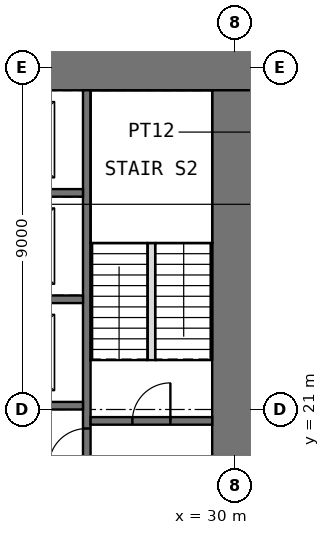
"""IFC4 building model, lengths in metres.
Left out: names, types, materials, properties, quantities, classifications, styles, units other than length and angle.
Written with IfcOpenShell. Run it as: python <this file> out.ifc"""

import sys

from ifc_helpers import new_model, si_unit, direction, frame, frame_2d, origin, place, context, subcontext, project, spatial, rectangle, extrude, element, fill, save


model = new_model("IFC4")
c1 = context("Model", 3, precision=1e-05, world=origin(), true_north=direction((0.0, 1.0)))
c2 = subcontext(c1, "Body", "Model", "MODEL_VIEW")
j1 = project(units=[si_unit("LENGTHUNIT", "METRE"), si_unit("PLANEANGLEUNIT", "RADIAN")], contexts=[c1])
p1 = place(None, origin())
s1 = spatial("IfcSite", under=j1, at=p1, CompositionType="ELEMENT")
p2 = place(p1, origin())
s2 = spatial("IfcBuilding", under=s1, at=p2, CompositionType="ELEMENT")
p3 = place(p2, frame((0.0, 0.0, 42.5)))
s3 = spatial("IfcBuildingStorey", under=s2, at=p3, CompositionType="ELEMENT", Elevation=42.5)
p4 = place(p3, frame((10.8, 30.3, -0.05), z_axis=(0.0, 0.0, 1.0), x_axis=(1.0, 0.0, 0.0)))
e1 = element("IfcWall", 1, at=p4, inside=s3, PredefinedType="SHEAR", context=c2, shape_type="SweptSolid", body=[
    extrude(rectangle(XDim=20.4, YDim=1.8, at=frame_2d((10.2, 0.0))), origin(), (0.0, 0.0, 1.0), 4.0),
])
p5 = place(p4, frame((9.2, 0.0, 0.05)))
e2 = element("IfcOpeningElement", 2, at=p5, cuts=e1, PredefinedType="OPENING", context=c2, shape_type="SweptSolid", body=[
    extrude(rectangle(XDim=2.0, YDim=2.2, at=frame_2d((1.0, 1.1))), frame((0.0, 0.91, 0.0), z_axis=(0.0, -1.0, 0.0), x_axis=(1.0, 0.0, 0.0)), (0.0, 0.0, 1.0), 1.82),
])
p6 = place(p3, frame((30.3, 12.6, -0.05), z_axis=(0.0, 0.0, 1.0), x_axis=(0.0, 1.0, 0.0)))
e3 = element("IfcWall", 3, at=p6, inside=s3, PredefinedType="SHEAR", context=c2, shape_type="SweptSolid", body=[
    extrude(rectangle(XDim=16.8, YDim=1.8, at=frame_2d((8.4, 0.0))), origin(), (0.0, 0.0, 1.0), 4.0),
])
p7 = place(p6, frame((5.9, 0.0, 0.05)))
e4 = element("IfcOpeningElement", 4, at=p7, cuts=e3, PredefinedType="OPENING", context=c2, shape_type="SweptSolid", body=[
    extrude(rectangle(XDim=1.0, YDim=2.2, at=frame_2d((0.5, 1.1))), frame((0.0, 0.91, 0.0), z_axis=(0.0, -1.0, 0.0), x_axis=(1.0, 0.0, 0.0)), (0.0, 0.0, 1.0), 1.82),
])
p8 = place(p3, frame((26.1, 12.6, -0.05), z_axis=(0.0, 0.0, 1.0), x_axis=(0.0, 1.0, 0.0)))
e5 = element("IfcWall", 5, at=p8, inside=s3, PredefinedType="SHEAR", context=c2, shape_type="SweptSolid", body=[
    extrude(rectangle(XDim=16.8, YDim=0.2, at=frame_2d((8.4, 0.0))), origin(), (0.0, 0.0, 1.0), 4.0),
])
p9 = place(p8, frame((6.9, 0.0, 0.05)))
e6 = element("IfcOpeningElement", 6, at=p9, cuts=e5, PredefinedType="OPENING", context=c2, shape_type="SweptSolid", body=[
    extrude(rectangle(XDim=1.0, YDim=2.2, at=frame_2d((0.5, 1.1))), frame((0.0, 0.11, 0.0), z_axis=(0.0, -1.0, 0.0), x_axis=(1.0, 0.0, 0.0)), (0.0, 0.0, 1.0), 0.22),
])
for number, where, z_axis, x_axis in (
    (7, (22.8, 21.1, -0.05), (0.0, 0.0, 1.0), (1.0, 0.0, 0.0)),
    (8, (22.8, 23.9, -0.05), (0.0, 0.0, 1.0), (1.0, 0.0, 0.0)),
    (9, (22.8, 26.7, -0.05), (0.0, 0.0, 1.0), (1.0, 0.0, 0.0)),
):
    element("IfcWall", number, at=place(p3, frame(where, z_axis=z_axis, x_axis=x_axis)), inside=s3, PredefinedType="SHEAR", context=c2, shape_type="SweptSolid", body=[
        extrude(rectangle(XDim=3.2, YDim=0.2, at=frame_2d((1.6, 0.0))), origin(), (0.0, 0.0, 1.0), 4.0),
    ])
p10 = place(p3, frame((26.2, 20.7, -0.05), z_axis=(0.0, 0.0, 1.0), x_axis=(1.0, 0.0, 0.0)))
e10 = element("IfcWall", 10, at=p10, inside=s3, PredefinedType="SHEAR", context=c2, shape_type="SweptSolid", body=[
    extrude(rectangle(XDim=3.2, YDim=0.2, at=frame_2d((1.6, 0.0))), origin(), (0.0, 0.0, 1.0), 4.0),
])
p11 = place(p10, frame((1.1, 0.0, 0.05)))
e11 = element("IfcOpeningElement", 11, at=p11, cuts=e10, PredefinedType="OPENING", context=c2, shape_type="SweptSolid", body=[
    extrude(rectangle(XDim=1.0, YDim=2.2, at=frame_2d((0.5, 1.1))), frame((0.0, 0.11, 0.0), z_axis=(0.0, -1.0, 0.0), x_axis=(1.0, 0.0, 0.0)), (0.0, 0.0, 1.0), 0.22),
])
p12 = place(p3, frame((27.8, 22.3, 0.0), z_axis=(0.0, 0.0, 1.0), x_axis=(0.0, 1.0, 0.0)))
e12 = element("IfcWall", 12, at=p12, inside=s3, PredefinedType="PARTITIONING", context=c2, shape_type="SweptSolid", body=[
    extrude(rectangle(XDim=3.08, YDim=0.2, at=frame_2d((1.54, 0.0))), origin(), (0.0, 0.0, 1.0), 4.0),
])
p13 = place(p11, origin())
e13 = element("IfcDoor", 13, at=p13, inside=s3, OperationType="SINGLE_SWING_RIGHT", PredefinedType="DOOR", context=c2, shape_type="SweptSolid", body=[
    extrude(rectangle(XDim=1.0, YDim=2.2, at=frame_2d((0.5, 1.1))), frame((0.0, 0.025, 0.0), z_axis=(0.0, -1.0, 0.0), x_axis=(1.0, 0.0, 0.0)), (0.0, 0.0, 1.0), 0.05),
])
fill(e11, e13)
p14 = place(p9, origin())
e14 = element("IfcDoor", 14, at=p14, inside=s3, OperationType="SINGLE_SWING_LEFT", PredefinedType="DOOR", context=c2, shape_type="SweptSolid", body=[
    extrude(rectangle(XDim=1.0, YDim=2.2, at=frame_2d((0.5, 1.1))), frame((0.0, 0.025, 0.0), z_axis=(0.0, -1.0, 0.0), x_axis=(1.0, 0.0, 0.0)), (0.0, 0.0, 1.0), 0.05),
])
fill(e6, e14)
save(model, sys.argv[1])
